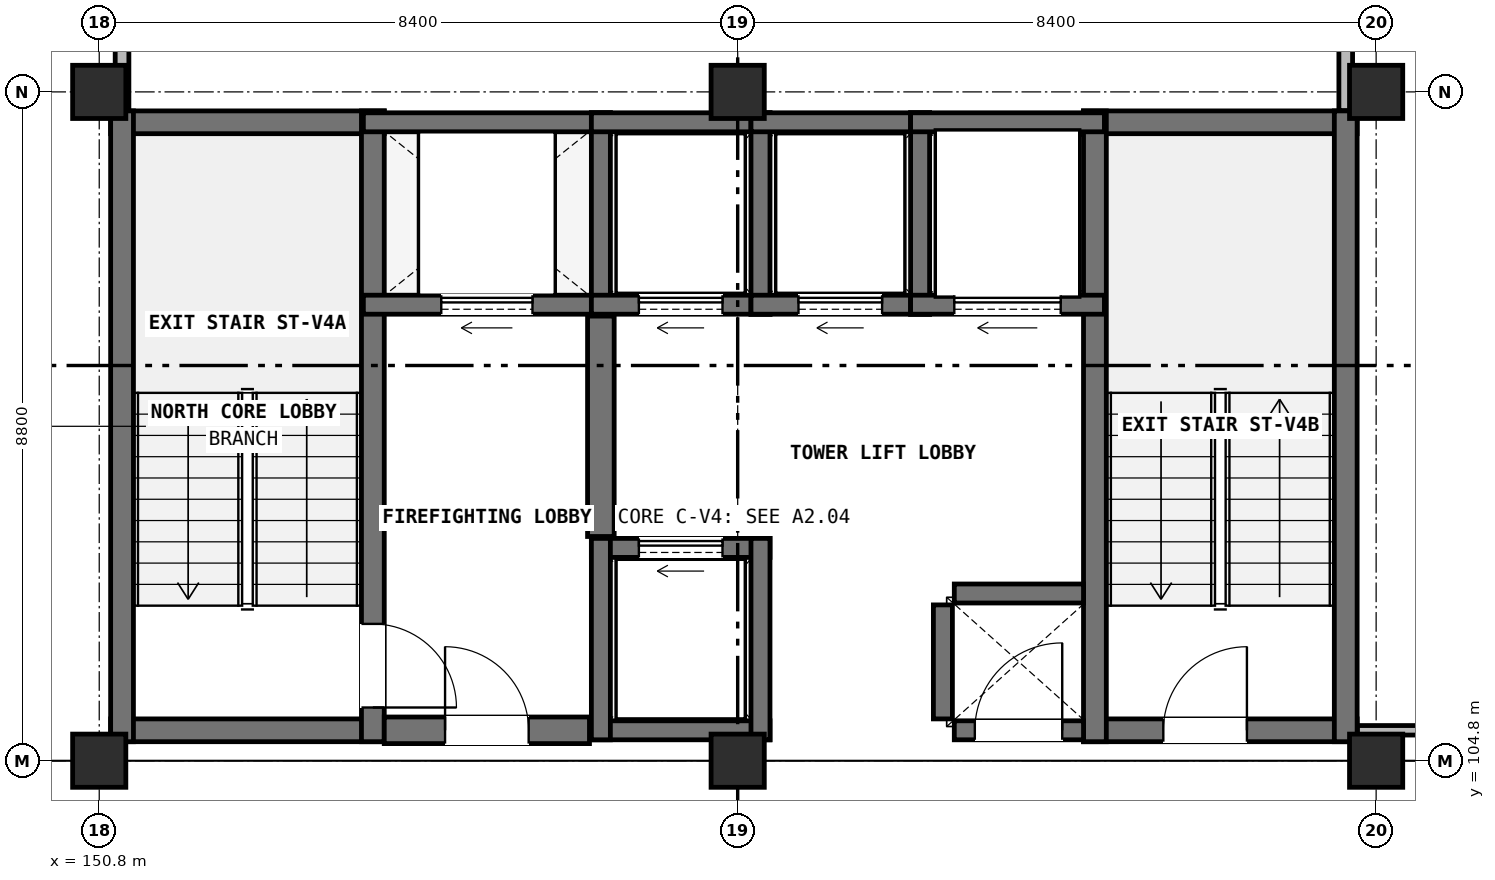
"""IFC4 building model, lengths in metres.
Left out: names, types, materials, properties, quantities, classifications, styles, units other than length and angle.
Written with IfcOpenShell. Run it as: python <this file> out.ifc"""

import sys

from ifc_helpers import new_model, si_unit, direction, frame, frame_2d, origin, origin_2d, place, context, subcontext, project, spatial, rectangle, extrude, element, fill, save


model = new_model("IFC4")
c1 = context("Model", 3, precision=1e-05, world=origin(), true_north=direction((0.0, 1.0)))
c2 = subcontext(c1, "Body", "Model", "MODEL_VIEW")
j1 = project(units=[si_unit("LENGTHUNIT", "METRE"), si_unit("PLANEANGLEUNIT", "RADIAN")], contexts=[c1])
p1 = place(None, origin())
s1 = spatial("IfcSite", under=j1, at=p1, CompositionType="ELEMENT")
p2 = place(p1, origin())
s2 = spatial("IfcBuilding", under=s1, at=p2, CompositionType="ELEMENT")
p3 = place(p2, frame((0.0, 0.0, 21.0)))
s3 = spatial("IfcBuildingStorey", under=s2, at=p3, CompositionType="ELEMENT", Elevation=21.0)
for number, where, z_axis, x_axis in (
    (1, (150.8, 104.8, 0.0), (0.0, 0.0, 1.0), (1.0, 0.0, 0.0)),
    (2, (150.8, 113.6, 0.0), (0.0, 0.0, 1.0), (1.0, 0.0, 0.0)),
    (3, (159.2, 104.8, 0.0), (0.0, 0.0, 1.0), (1.0, 0.0, 0.0)),
    (4, (159.2, 113.6, 0.0), (0.0, 0.0, 1.0), (1.0, 0.0, 0.0)),
    (5, (167.6, 104.8, 0.0), (0.0, 0.0, 1.0), (1.0, 0.0, 0.0)),
    (6, (167.6, 113.6, 0.0), (0.0, 0.0, 1.0), (1.0, 0.0, 0.0)),
):
    element("IfcColumn", number, at=place(p3, frame(where, z_axis=z_axis, x_axis=x_axis)), inside=s3, PredefinedType="COLUMN", context=c2, shape_type="SweptSolid", body=[
        extrude(rectangle(XDim=0.7, YDim=0.7, at=origin_2d()), origin(), (0.0, 0.0, 1.0), 3.8),
    ])
for number, where, z_axis, x_axis in (
    (7, (150.95, 105.2, 0.0), (0.0, 0.0, 1.0), (1.0, 0.0, 0.0)),
    (8, (150.95, 113.2, 0.0), (0.0, 0.0, 1.0), (1.0, 0.0, 0.0)),
):
    element("IfcWall", number, at=place(p3, frame(where, z_axis=z_axis, x_axis=x_axis)), inside=s3, PredefinedType="SHEAR", context=c2, shape_type="SweptSolid", body=[
        extrude(rectangle(XDim=3.6, YDim=0.3, at=frame_2d((1.8, 0.0))), origin(), (0.0, 0.0, 1.0), 3.8),
    ])
p4 = place(p3, frame((151.1, 105.05, 0.0), z_axis=(0.0, 0.0, 1.0), x_axis=(0.0, 1.0, 0.0)))
e9 = element("IfcWall", 9, at=p4, inside=s3, PredefinedType="SHEAR", context=c2, shape_type="SweptSolid", body=[
    extrude(rectangle(XDim=8.3, YDim=0.3, at=frame_2d((4.15, 0.0))), origin(), (0.0, 0.0, 1.0), 3.8),
])
p5 = place(p3, frame((154.4, 105.05, 0.0), z_axis=(0.0, 0.0, 1.0), x_axis=(0.0, 1.0, 0.0)))
e10 = element("IfcWall", 10, at=p5, inside=s3, PredefinedType="SHEAR", context=c2, shape_type="SweptSolid", body=[
    extrude(rectangle(XDim=8.3, YDim=0.3, at=frame_2d((4.15, 0.0))), origin(), (0.0, 0.0, 1.0), 3.8),
])
p6 = place(p5, frame((0.45, 0.0, 0.0)))
e11 = element("IfcOpeningElement", 11, at=p6, cuts=e10, PredefinedType="OPENING", context=c2, shape_type="SweptSolid", body=[
    extrude(rectangle(XDim=1.1, YDim=2.2, at=frame_2d((0.55, 1.1))), frame((0.0, 0.16, 0.0), z_axis=(0.0, -1.0, 0.0), x_axis=(1.0, 0.0, 0.0)), (0.0, 0.0, 1.0), 0.32),
])
p7 = place(p3, frame((163.75, 105.2, 0.0), z_axis=(0.0, 0.0, 1.0), x_axis=(1.0, 0.0, 0.0)))
e12 = element("IfcWall", 12, at=p7, inside=s3, PredefinedType="SHEAR", context=c2, shape_type="SweptSolid", body=[
    extrude(rectangle(XDim=3.6, YDim=0.3, at=frame_2d((1.8, 0.0))), origin(), (0.0, 0.0, 1.0), 3.8),
])
p8 = place(p7, frame((1.05, 0.0, 0.0)))
e13 = element("IfcOpeningElement", 13, at=p8, cuts=e12, PredefinedType="OPENING", context=c2, shape_type="SweptSolid", body=[
    extrude(rectangle(XDim=1.1, YDim=2.2, at=frame_2d((0.55, 1.1))), frame((0.0, 0.16, 0.0), z_axis=(0.0, -1.0, 0.0), x_axis=(1.0, 0.0, 0.0)), (0.0, 0.0, 1.0), 0.32),
])
p9 = place(p3, frame((163.75, 113.2, 0.0), z_axis=(0.0, 0.0, 1.0), x_axis=(1.0, 0.0, 0.0)))
e14 = element("IfcWall", 14, at=p9, inside=s3, PredefinedType="SHEAR", context=c2, shape_type="SweptSolid", body=[
    extrude(rectangle(XDim=3.6, YDim=0.3, at=frame_2d((1.8, 0.0))), origin(), (0.0, 0.0, 1.0), 3.8),
])
for number, where, z_axis, x_axis in (
    (15, (163.9, 105.05, 0.0), (0.0, 0.0, 1.0), (0.0, 1.0, 0.0)),
    (16, (167.2, 105.05, 0.0), (0.0, 0.0, 1.0), (0.0, 1.0, 0.0)),
):
    element("IfcWall", number, at=place(p3, frame(where, z_axis=z_axis, x_axis=x_axis)), inside=s3, PredefinedType="SHEAR", context=c2, shape_type="SweptSolid", body=[
        extrude(rectangle(XDim=8.3, YDim=0.3, at=frame_2d((4.15, 0.0))), origin(), (0.0, 0.0, 1.0), 3.8),
    ])
p10 = place(p3, frame((154.275, 110.8, 0.0), z_axis=(0.0, 0.0, 1.0), x_axis=(1.0, 0.0, 0.0)))
e17 = element("IfcWall", 17, at=p10, inside=s3, PredefinedType="SOLIDWALL", context=c2, shape_type="SweptSolid", body=[
    extrude(rectangle(XDim=3.25, YDim=0.25, at=frame_2d((1.625, 0.0))), origin(), (0.0, 0.0, 1.0), 3.48),
])
p11 = place(p10, frame((1.025, 0.0, 0.0)))
e18 = element("IfcOpeningElement", 18, at=p11, cuts=e17, PredefinedType="OPENING", context=c2, shape_type="SweptSolid", body=[
    extrude(rectangle(XDim=1.2, YDim=2.2, at=frame_2d((0.6, 1.1))), frame((0.0, 0.135, 0.0), z_axis=(0.0, -1.0, 0.0), x_axis=(1.0, 0.0, 0.0)), (0.0, 0.0, 1.0), 0.27),
])
p12 = place(p3, frame((154.275, 113.2, 0.0), z_axis=(0.0, 0.0, 1.0), x_axis=(1.0, 0.0, 0.0)))
e19 = element("IfcWall", 19, at=p12, inside=s3, PredefinedType="SOLIDWALL", context=c2, shape_type="SweptSolid", body=[
    extrude(rectangle(XDim=3.25, YDim=0.25, at=frame_2d((1.625, 0.0))), origin(), (0.0, 0.0, 1.0), 3.48),
])
p13 = place(p3, frame((157.4, 110.675, 0.0), z_axis=(0.0, 0.0, 1.0), x_axis=(0.0, 1.0, 0.0)))
e20 = element("IfcWall", 20, at=p13, inside=s3, PredefinedType="SOLIDWALL", context=c2, shape_type="SweptSolid", body=[
    extrude(rectangle(XDim=2.65, YDim=0.25, at=frame_2d((1.325, 0.0))), origin(), (0.0, 0.0, 1.0), 3.48),
])
p14 = place(p3, frame((157.275, 110.8, 0.0), z_axis=(0.0, 0.0, 1.0), x_axis=(1.0, 0.0, 0.0)))
e21 = element("IfcWall", 21, at=p14, inside=s3, PredefinedType="SOLIDWALL", context=c2, shape_type="SweptSolid", body=[
    extrude(rectangle(XDim=2.35, YDim=0.25, at=frame_2d((1.175, 0.0))), origin(), (0.0, 0.0, 1.0), 3.48),
])
p15 = place(p14, frame((0.625, 0.0, 0.0)))
e22 = element("IfcOpeningElement", 22, at=p15, cuts=e21, PredefinedType="OPENING", context=c2, shape_type="SweptSolid", body=[
    extrude(rectangle(XDim=1.1, YDim=2.2, at=frame_2d((0.55, 1.1))), frame((0.0, 0.135, 0.0), z_axis=(0.0, -1.0, 0.0), x_axis=(1.0, 0.0, 0.0)), (0.0, 0.0, 1.0), 0.27),
])
p16 = place(p3, frame((157.275, 113.2, 0.0), z_axis=(0.0, 0.0, 1.0), x_axis=(1.0, 0.0, 0.0)))
e23 = element("IfcWall", 23, at=p16, inside=s3, PredefinedType="SOLIDWALL", context=c2, shape_type="SweptSolid", body=[
    extrude(rectangle(XDim=2.35, YDim=0.25, at=frame_2d((1.175, 0.0))), origin(), (0.0, 0.0, 1.0), 3.48),
])
p17 = place(p3, frame((159.5, 110.675, 0.0), z_axis=(0.0, 0.0, 1.0), x_axis=(0.0, 1.0, 0.0)))
e24 = element("IfcWall", 24, at=p17, inside=s3, PredefinedType="SOLIDWALL", context=c2, shape_type="SweptSolid", body=[
    extrude(rectangle(XDim=2.65, YDim=0.25, at=frame_2d((1.325, 0.0))), origin(), (0.0, 0.0, 1.0), 3.48),
])
p18 = place(p3, frame((159.375, 110.8, 0.0), z_axis=(0.0, 0.0, 1.0), x_axis=(1.0, 0.0, 0.0)))
e25 = element("IfcWall", 25, at=p18, inside=s3, PredefinedType="SOLIDWALL", context=c2, shape_type="SweptSolid", body=[
    extrude(rectangle(XDim=2.35, YDim=0.25, at=frame_2d((1.175, 0.0))), origin(), (0.0, 0.0, 1.0), 3.48),
])
p19 = place(p18, frame((0.625, 0.0, 0.0)))
e26 = element("IfcOpeningElement", 26, at=p19, cuts=e25, PredefinedType="OPENING", context=c2, shape_type="SweptSolid", body=[
    extrude(rectangle(XDim=1.1, YDim=2.2, at=frame_2d((0.55, 1.1))), frame((0.0, 0.135, 0.0), z_axis=(0.0, -1.0, 0.0), x_axis=(1.0, 0.0, 0.0)), (0.0, 0.0, 1.0), 0.27),
])
p20 = place(p3, frame((159.375, 113.2, 0.0), z_axis=(0.0, 0.0, 1.0), x_axis=(1.0, 0.0, 0.0)))
e27 = element("IfcWall", 27, at=p20, inside=s3, PredefinedType="SOLIDWALL", context=c2, shape_type="SweptSolid", body=[
    extrude(rectangle(XDim=2.35, YDim=0.25, at=frame_2d((1.175, 0.0))), origin(), (0.0, 0.0, 1.0), 3.48),
])
p21 = place(p3, frame((161.6, 110.675, 0.0), z_axis=(0.0, 0.0, 1.0), x_axis=(0.0, 1.0, 0.0)))
e28 = element("IfcWall", 28, at=p21, inside=s3, PredefinedType="SOLIDWALL", context=c2, shape_type="SweptSolid", body=[
    extrude(rectangle(XDim=2.65, YDim=0.25, at=frame_2d((1.325, 0.0))), origin(), (0.0, 0.0, 1.0), 3.48),
])
p22 = place(p3, frame((157.275, 105.2, 0.0), z_axis=(0.0, 0.0, 1.0), x_axis=(1.0, 0.0, 0.0)))
e29 = element("IfcWall", 29, at=p22, inside=s3, PredefinedType="SOLIDWALL", context=c2, shape_type="SweptSolid", body=[
    extrude(rectangle(XDim=2.35, YDim=0.25, at=frame_2d((1.175, 0.0))), origin(), (0.0, 0.0, 1.0), 3.48),
])
p23 = place(p3, frame((157.275, 107.6, 0.0), z_axis=(0.0, 0.0, 1.0), x_axis=(1.0, 0.0, 0.0)))
e30 = element("IfcWall", 30, at=p23, inside=s3, PredefinedType="SOLIDWALL", context=c2, shape_type="SweptSolid", body=[
    extrude(rectangle(XDim=2.35, YDim=0.25, at=frame_2d((1.175, 0.0))), origin(), (0.0, 0.0, 1.0), 3.48),
])
p24 = place(p23, frame((0.625, 0.0, 0.0)))
e31 = element("IfcOpeningElement", 31, at=p24, cuts=e30, PredefinedType="OPENING", context=c2, shape_type="SweptSolid", body=[
    extrude(rectangle(XDim=1.1, YDim=2.2, at=frame_2d((0.55, 1.1))), frame((0.0, 0.135, 0.0), z_axis=(0.0, -1.0, 0.0), x_axis=(1.0, 0.0, 0.0)), (0.0, 0.0, 1.0), 0.27),
])
for number, where, z_axis, x_axis in (
    (32, (157.4, 105.075, 0.0), (0.0, 0.0, 1.0), (0.0, 1.0, 0.0)),
    (33, (159.5, 105.075, 0.0), (0.0, 0.0, 1.0), (0.0, 1.0, 0.0)),
):
    element("IfcWall", number, at=place(p3, frame(where, z_axis=z_axis, x_axis=x_axis)), inside=s3, PredefinedType="SOLIDWALL", context=c2, shape_type="SweptSolid", body=[
        extrude(rectangle(XDim=2.65, YDim=0.25, at=frame_2d((1.325, 0.0))), origin(), (0.0, 0.0, 1.0), 3.48),
    ])
p25 = place(p3, frame((161.475, 110.8, 0.0), z_axis=(0.0, 0.0, 1.0), x_axis=(1.0, 0.0, 0.0)))
e34 = element("IfcWall", 34, at=p25, inside=s3, PredefinedType="SOLIDWALL", context=c2, shape_type="SweptSolid", body=[
    extrude(rectangle(XDim=2.55, YDim=0.25, at=frame_2d((1.275, 0.0))), origin(), (0.0, 0.0, 1.0), 3.48),
])
p26 = place(p25, frame((0.575, 0.0, 0.0)))
e35 = element("IfcOpeningElement", 35, at=p26, cuts=e34, PredefinedType="OPENING", context=c2, shape_type="SweptSolid", body=[
    extrude(rectangle(XDim=1.4, YDim=2.3, at=frame_2d((0.7, 1.15))), frame((0.0, 0.135, 0.0), z_axis=(0.0, -1.0, 0.0), x_axis=(1.0, 0.0, 0.0)), (0.0, 0.0, 1.0), 0.27),
])
p27 = place(p3, frame((161.475, 113.2, 0.0), z_axis=(0.0, 0.0, 1.0), x_axis=(1.0, 0.0, 0.0)))
e36 = element("IfcWall", 36, at=p27, inside=s3, PredefinedType="SOLIDWALL", context=c2, shape_type="SweptSolid", body=[
    extrude(rectangle(XDim=2.55, YDim=0.25, at=frame_2d((1.275, 0.0))), origin(), (0.0, 0.0, 1.0), 3.48),
])
p28 = place(p3, frame((157.4, 107.75, 0.0), z_axis=(0.0, 0.0, 1.0), x_axis=(0.0, 1.0, 0.0)))
e37 = element("IfcWall", 37, at=p28, inside=s3, PredefinedType="SHEAR", context=c2, shape_type="SweptSolid", body=[
    extrude(rectangle(XDim=2.9, YDim=0.35, at=frame_2d((1.45, 0.0))), origin(), (0.0, 0.0, 1.0), 3.48),
])
p29 = place(p3, frame((154.55, 105.2, 0.0), z_axis=(0.0, 0.0, 1.0), x_axis=(1.0, 0.0, 0.0)))
e38 = element("IfcWall", 38, at=p29, inside=s3, PredefinedType="SHEAR", context=c2, shape_type="SweptSolid", body=[
    extrude(rectangle(XDim=2.7, YDim=0.35, at=frame_2d((1.35, 0.0))), origin(), (0.0, 0.0, 1.0), 3.48),
])
p30 = place(p29, frame((0.8, 0.0, 0.0)))
e39 = element("IfcOpeningElement", 39, at=p30, cuts=e38, PredefinedType="OPENING", context=c2, shape_type="SweptSolid", body=[
    extrude(rectangle(XDim=1.1, YDim=2.2, at=frame_2d((0.55, 1.1))), frame((0.0, 0.185, 0.0), z_axis=(0.0, -1.0, 0.0), x_axis=(1.0, 0.0, 0.0)), (0.0, 0.0, 1.0), 0.37),
])
p31 = place(p3, frame((161.9, 105.35, 0.0), z_axis=(0.0, 0.0, 1.0), x_axis=(0.0, 1.0, 0.0)))
e40 = element("IfcWall", 40, at=p31, inside=s3, PredefinedType="SOLIDWALL", context=c2, shape_type="SweptSolid", body=[
    extrude(rectangle(XDim=1.5, YDim=0.25, at=frame_2d((0.75, 0.0))), origin(), (0.0, 0.0, 1.0), 3.48),
])
p32 = place(p3, frame((162.05, 107.0, 0.0), z_axis=(0.0, 0.0, 1.0), x_axis=(1.0, 0.0, 0.0)))
e41 = element("IfcWall", 41, at=p32, inside=s3, PredefinedType="SOLIDWALL", context=c2, shape_type="SweptSolid", body=[
    extrude(rectangle(XDim=1.7, YDim=0.25, at=frame_2d((0.85, 0.0))), origin(), (0.0, 0.0, 1.0), 3.48),
])
p33 = place(p3, frame((162.05, 105.2, 0.0), z_axis=(0.0, 0.0, 1.0), x_axis=(1.0, 0.0, 0.0)))
e42 = element("IfcWall", 42, at=p33, inside=s3, PredefinedType="SOLIDWALL", context=c2, shape_type="SweptSolid", body=[
    extrude(rectangle(XDim=1.7, YDim=0.25, at=frame_2d((0.85, 0.0))), origin(), (0.0, 0.0, 1.0), 3.48),
])
p34 = place(p33, frame((0.27, 0.0, 0.0)))
e43 = element("IfcOpeningElement", 43, at=p34, cuts=e42, PredefinedType="OPENING", context=c2, shape_type="SweptSolid", body=[
    extrude(rectangle(XDim=1.15, YDim=2.2, at=frame_2d((0.575, 1.1))), frame((0.0, 0.135, 0.0), z_axis=(0.0, -1.0, 0.0), x_axis=(1.0, 0.0, 0.0)), (0.0, 0.0, 1.0), 0.27),
])
p35 = place(p3, frame((167.355, 105.2, 0.0), z_axis=(0.0, 0.0, 1.0), x_axis=(1.0, 0.0, 0.0)))
e44 = element("IfcWall", 44, at=p35, inside=s3, PredefinedType="PARTITIONING", context=c2, shape_type="SweptSolid", body=[
    extrude(rectangle(XDim=4.245, YDim=0.125, at=frame_2d((2.123, 0.0))), origin(), (0.0, 0.0, 1.0), 2.945),
])
p36 = place(p35, frame((1.633, 0.0, 0.0)))
e45 = element("IfcOpeningElement", 45, at=p36, cuts=e44, PredefinedType="OPENING", context=c2, shape_type="SweptSolid", body=[
    extrude(rectangle(XDim=0.98, YDim=2.1, at=frame_2d((0.49, 1.05))), frame((0.0, 0.073, 0.0), z_axis=(0.0, -1.0, 0.0), x_axis=(1.0, 0.0, 0.0)), (0.0, 0.0, 1.0), 0.145),
])
p37 = place(p3, frame((151.1, 113.355, 0.0), z_axis=(0.0, 0.0, 1.0), x_axis=(0.0, 1.0, 0.0)))
e46 = element("IfcWall", 46, at=p37, inside=s3, PredefinedType="PARTITIONING", context=c2, shape_type="SweptSolid", body=[
    extrude(rectangle(XDim=6.045, YDim=0.18, at=frame_2d((3.022, 0.0))), origin(), (0.0, 0.0, 1.0), 2.945),
])
p38 = place(p37, frame((2.333, 0.0, 0.0)))
e47 = element("IfcOpeningElement", 47, at=p38, cuts=e46, PredefinedType="OPENING", context=c2, shape_type="SweptSolid", body=[
    extrude(rectangle(XDim=1.38, YDim=2.2, at=frame_2d((0.69, 1.1))), frame((0.0, 0.1, 0.0), z_axis=(0.0, -1.0, 0.0), x_axis=(1.0, 0.0, 0.0)), (0.0, 0.0, 1.0), 0.2),
])
p39 = place(p3, frame((167.2, 113.355, 0.0), z_axis=(0.0, 0.0, 1.0), x_axis=(0.0, 1.0, 0.0)))
e48 = element("IfcWall", 48, at=p39, inside=s3, PredefinedType="PARTITIONING", context=c2, shape_type="SweptSolid", body=[
    extrude(rectangle(XDim=8.695, YDim=0.18, at=frame_2d((4.348, 0.0))), origin(), (0.0, 0.0, 1.0), 2.945),
])
p40 = place(p6, frame((1.1, 0.0, 0.0), z_axis=(0.0, 0.0, 1.0), x_axis=(-1.0, 0.0, 0.0)))
e49 = element("IfcDoor", 49, at=p40, inside=s3, OperationType="SINGLE_SWING_LEFT", PredefinedType="DOOR", context=c2, shape_type="SweptSolid", body=[
    extrude(rectangle(XDim=1.1, YDim=2.2, at=frame_2d((0.55, 1.1))), frame((0.0, 0.025, 0.0), z_axis=(0.0, -1.0, 0.0), x_axis=(1.0, 0.0, 0.0)), (0.0, 0.0, 1.0), 0.05),
])
fill(e11, e49)
p41 = place(p8, origin())
e50 = element("IfcDoor", 50, at=p41, inside=s3, OperationType="SINGLE_SWING_RIGHT", PredefinedType="DOOR", context=c2, shape_type="SweptSolid", body=[
    extrude(rectangle(XDim=1.1, YDim=2.2, at=frame_2d((0.55, 1.1))), frame((0.0, 0.025, 0.0), z_axis=(0.0, -1.0, 0.0), x_axis=(1.0, 0.0, 0.0)), (0.0, 0.0, 1.0), 0.05),
])
fill(e13, e50)
p42 = place(p11, origin())
e51 = element("IfcDoor", 51, at=p42, inside=s3, OperationType="SLIDING_TO_LEFT", PredefinedType="DOOR", context=c2, shape_type="SweptSolid", body=[
    extrude(rectangle(XDim=1.2, YDim=2.2, at=frame_2d((0.6, 1.1))), frame((0.0, 0.025, 0.0), z_axis=(0.0, -1.0, 0.0), x_axis=(1.0, 0.0, 0.0)), (0.0, 0.0, 1.0), 0.05),
])
fill(e18, e51)
p43 = place(p15, origin())
e52 = element("IfcDoor", 52, at=p43, inside=s3, OperationType="SLIDING_TO_LEFT", PredefinedType="DOOR", context=c2, shape_type="SweptSolid", body=[
    extrude(rectangle(XDim=1.1, YDim=2.2, at=frame_2d((0.55, 1.1))), frame((0.0, 0.025, 0.0), z_axis=(0.0, -1.0, 0.0), x_axis=(1.0, 0.0, 0.0)), (0.0, 0.0, 1.0), 0.05),
])
fill(e22, e52)
p44 = place(p19, origin())
e53 = element("IfcDoor", 53, at=p44, inside=s3, OperationType="SLIDING_TO_LEFT", PredefinedType="DOOR", context=c2, shape_type="SweptSolid", body=[
    extrude(rectangle(XDim=1.1, YDim=2.2, at=frame_2d((0.55, 1.1))), frame((0.0, 0.025, 0.0), z_axis=(0.0, -1.0, 0.0), x_axis=(1.0, 0.0, 0.0)), (0.0, 0.0, 1.0), 0.05),
])
fill(e26, e53)
p45 = place(p24, origin())
e54 = element("IfcDoor", 54, at=p45, inside=s3, OperationType="SLIDING_TO_LEFT", PredefinedType="DOOR", context=c2, shape_type="SweptSolid", body=[
    extrude(rectangle(XDim=1.1, YDim=2.2, at=frame_2d((0.55, 1.1))), frame((0.0, 0.025, 0.0), z_axis=(0.0, -1.0, 0.0), x_axis=(1.0, 0.0, 0.0)), (0.0, 0.0, 1.0), 0.05),
])
fill(e31, e54)
p46 = place(p26, origin())
e55 = element("IfcDoor", 55, at=p46, inside=s3, OperationType="SLIDING_TO_LEFT", PredefinedType="DOOR", context=c2, shape_type="SweptSolid", body=[
    extrude(rectangle(XDim=1.4, YDim=2.3, at=frame_2d((0.7, 1.15))), frame((0.0, 0.025, 0.0), z_axis=(0.0, -1.0, 0.0), x_axis=(1.0, 0.0, 0.0)), (0.0, 0.0, 1.0), 0.05),
])
fill(e35, e55)
p47 = place(p30, origin())
e56 = element("IfcDoor", 56, at=p47, inside=s3, OperationType="SINGLE_SWING_LEFT", PredefinedType="DOOR", context=c2, shape_type="SweptSolid", body=[
    extrude(rectangle(XDim=1.1, YDim=2.2, at=frame_2d((0.55, 1.1))), frame((0.0, 0.025, 0.0), z_axis=(0.0, -1.0, 0.0), x_axis=(1.0, 0.0, 0.0)), (0.0, 0.0, 1.0), 0.05),
])
fill(e39, e56)
p48 = place(p34, origin())
e57 = element("IfcDoor", 57, at=p48, inside=s3, OperationType="SINGLE_SWING_RIGHT", PredefinedType="DOOR", context=c2, shape_type="SweptSolid", body=[
    extrude(rectangle(XDim=1.15, YDim=2.2, at=frame_2d((0.575, 1.1))), frame((0.0, 0.025, 0.0), z_axis=(0.0, -1.0, 0.0), x_axis=(1.0, 0.0, 0.0)), (0.0, 0.0, 1.0), 0.05),
])
fill(e43, e57)
save(model, sys.argv[1])
